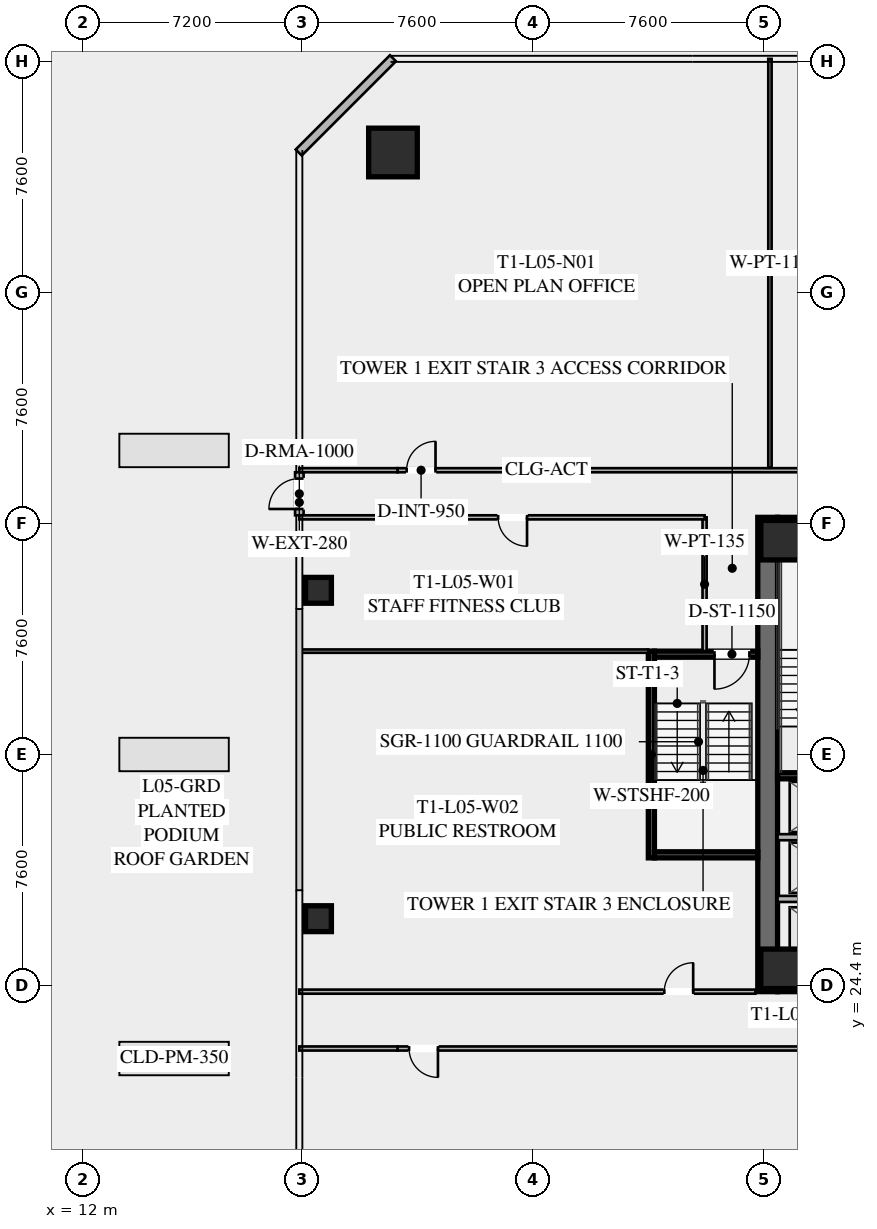
"""IFC4 building model, lengths in metres.
Left out: names, types, materials, properties, quantities, classifications, styles, units other than length and angle.
Written with IfcOpenShell. Run it as: python <this file> out.ifc"""

import sys

from ifc_helpers import new_model, si_unit, direction, frame, frame_2d, origin, origin_2d, place, context, subcontext, project, spatial, rectangle, hollow_rectangle, extrude, element, fill, save


model = new_model("IFC4")
c1 = context("Model", 3, precision=1e-05, world=origin(), true_north=direction((0.0, 1.0)))
c2 = subcontext(c1, "Body", "Model", "MODEL_VIEW")
j1 = project(units=[si_unit("LENGTHUNIT", "METRE"), si_unit("PLANEANGLEUNIT", "RADIAN")], contexts=[c1])
p1 = place(None, origin())
s1 = spatial("IfcSite", under=j1, at=p1, CompositionType="ELEMENT")
p2 = place(p1, origin())
s2 = spatial("IfcBuilding", under=s1, at=p2, CompositionType="ELEMENT")
p3 = place(p2, frame((0.0, 0.0, 24.6)))
s3 = spatial("IfcBuildingStorey", under=s2, at=p3, CompositionType="ELEMENT", Elevation=24.6)
p4 = place(p3, frame((34.525, 24.2, 0.0), z_axis=(0.0, 0.0, 1.0), x_axis=(0.0, 1.0, 0.0)))
e1 = element("IfcWall", 1, at=p4, inside=s3, PredefinedType="SHEAR", context=c2, shape_type="SweptSolid", body=[
    extrude(rectangle(XDim=15.6, YDim=0.65, at=frame_2d((7.8, 0.0))), origin(), (0.0, 0.0, 1.0), 3.55),
])
p5 = place(p3, frame((49.15, 24.525, 0.0), z_axis=(0.0, 0.0, 1.0), x_axis=(-1.0, 0.0, 0.0)))
e2 = element("IfcWall", 2, at=p5, inside=s3, PredefinedType="SHEAR", context=c2, shape_type="SweptSolid", body=[
    extrude(rectangle(XDim=14.3, YDim=0.65, at=frame_2d((7.15, 0.0))), origin(), (0.0, 0.0, 1.0), 3.55),
])
p6 = place(p5, frame((8.85, 0.0, 0.0)))
e3 = element("IfcOpeningElement", 3, at=p6, cuts=e2, PredefinedType="OPENING", context=c2, shape_type="SweptSolid", body=[
    extrude(rectangle(XDim=1.25, YDim=2.25, at=frame_2d((0.625, 1.125))), frame((0.0, 0.335, 0.0), z_axis=(0.0, -1.0, 0.0), x_axis=(1.0, 0.0, 0.0)), (0.0, 0.0, 1.0), 0.67),
])
p7 = place(p5, frame((3.8, 0.0, 0.0)))
e4 = element("IfcOpeningElement", 4, at=p7, cuts=e2, PredefinedType="OPENING", context=c2, shape_type="SweptSolid", body=[
    extrude(rectangle(XDim=1.25, YDim=2.25, at=frame_2d((0.625, 1.125))), frame((0.0, 0.335, 0.0), z_axis=(0.0, -1.0, 0.0), x_axis=(1.0, 0.0, 0.0)), (0.0, 0.0, 1.0), 0.67),
])
p8 = place(p3, frame((34.85, 39.475, 0.0), z_axis=(0.0, 0.0, 1.0), x_axis=(1.0, 0.0, 0.0)))
e5 = element("IfcWall", 5, at=p8, inside=s3, PredefinedType="SHEAR", context=c2, shape_type="SweptSolid", body=[
    extrude(rectangle(XDim=14.3, YDim=0.65, at=frame_2d((7.15, 0.0))), origin(), (0.0, 0.0, 1.0), 3.55),
])
p9 = place(p8, frame((4.2, 0.0, 0.0)))
e6 = element("IfcOpeningElement", 6, at=p9, cuts=e5, PredefinedType="OPENING", context=c2, shape_type="SweptSolid", body=[
    extrude(rectangle(XDim=1.25, YDim=2.25, at=frame_2d((0.625, 1.125))), frame((0.0, 0.335, 0.0), z_axis=(0.0, -1.0, 0.0), x_axis=(1.0, 0.0, 0.0)), (0.0, 0.0, 1.0), 0.67),
])
p10 = place(p8, frame((9.25, 0.0, 0.0)))
e7 = element("IfcOpeningElement", 7, at=p10, cuts=e5, PredefinedType="OPENING", context=c2, shape_type="SweptSolid", body=[
    extrude(rectangle(XDim=1.25, YDim=2.25, at=frame_2d((0.625, 1.125))), frame((0.0, 0.335, 0.0), z_axis=(0.0, -1.0, 0.0), x_axis=(1.0, 0.0, 0.0)), (0.0, 0.0, 1.0), 0.67),
])
for number, where, z_axis, x_axis in (
    (8, (34.95, 24.95, 0.0), (0.0, 0.0, 1.0), (1.0, 0.0, 0.0)),
    (9, (34.95, 39.05, 0.0), (0.0, 0.0, 1.0), (1.0, 0.0, 0.0)),
):
    element("IfcColumn", number, at=place(p3, frame(where, z_axis=z_axis, x_axis=x_axis)), inside=s3, PredefinedType="COLUMN", context=c2, shape_type="SweptSolid", body=[
        extrude(hollow_rectangle(XDim=1.3, YDim=1.3, WallThickness=0.05, at=origin_2d()), origin(), (0.0, 0.0, 1.0), 3.35),
    ])
p11 = place(p3, frame((22.2, 51.8, 0.0), z_axis=(0.0, 0.0, 1.0), x_axis=(1.0, 0.0, 0.0)))
e10 = element("IfcColumn", 10, at=p11, inside=s3, PredefinedType="COLUMN", context=c2, shape_type="SweptSolid", body=[
    extrude(hollow_rectangle(XDim=1.6, YDim=1.6, WallThickness=0.06, at=origin_2d()), origin(), (0.0, 0.0, 1.0), 3.35),
])
for number, where, z_axis, x_axis in (
    (11, (19.75, 37.4, 0.0), (0.0, 0.0, 1.0), (1.0, 0.0, 0.0)),
    (12, (19.75, 26.6, 0.0), (0.0, 0.0, 1.0), (1.0, 0.0, 0.0)),
):
    element("IfcColumn", number, at=place(p3, frame(where, z_axis=z_axis, x_axis=x_axis)), inside=s3, PredefinedType="COLUMN", context=c2, shape_type="SweptSolid", body=[
        extrude(hollow_rectangle(XDim=0.85, YDim=0.85, WallThickness=0.035, at=origin_2d()), origin(), (0.0, 0.0, 1.0), 3.35),
    ])
p12 = place(p3, frame((19.12, 39.867, 0.0), z_axis=(0.0, 0.0, 1.0), x_axis=(0.0, 1.0, 0.0)))
e13 = element("IfcWall", 13, at=p12, inside=s3, PredefinedType="SOLIDWALL", context=c2, shape_type="SweptSolid", body=[
    extrude(rectangle(XDim=1.415, YDim=0.28, at=frame_2d((0.708, 0.0))), origin(), (0.0, 0.0, 1.0), 3.35),
])
p13 = place(p12, frame((0.208, 0.0, 0.0)))
e14 = element("IfcOpeningElement", 14, at=p13, cuts=e13, PredefinedType="OPENING", context=c2, shape_type="SweptSolid", body=[
    extrude(rectangle(XDim=1.0, YDim=2.15, at=frame_2d((0.5, 1.075))), frame((0.0, 0.15, 0.0), z_axis=(0.0, -1.0, 0.0), x_axis=(1.0, 0.0, 0.0)), (0.0, 0.0, 1.0), 0.3),
])
p14 = place(p3, frame((19.1, 51.8, 0.0), z_axis=(0.0, 0.0, 1.0), x_axis=(0.707106781187, 0.707106781187, 0.0)))
e15 = element("IfcWall", 15, at=p14, inside=s3, PredefinedType="SOLIDWALL", context=c2, shape_type="SweptSolid", body=[
    extrude(rectangle(XDim=4.384, YDim=0.28, at=frame_2d((2.192, 0.0))), origin(), (0.0, 0.0, 1.0), 3.35),
])
for number, where, z_axis, x_axis in (
    (16, (34.85, 31.3, 0.0), (0.0, 0.0, 1.0), (1.0, 0.0, 0.0)),
    (17, (34.85, 38.7, 0.0), (0.0, 0.0, 1.0), (1.0, 0.0, 0.0)),
):
    element("IfcWall", number, at=place(p3, frame(where, z_axis=z_axis, x_axis=x_axis)), inside=s3, PredefinedType="SHEAR", context=c2, shape_type="SweptSolid", body=[
        extrude(rectangle(XDim=3.45, YDim=0.2, at=frame_2d((1.725, 0.0))), origin(), (0.0, 0.0, 1.0), 3.35),
    ])
for number, where, z_axis, x_axis in (
    (18, (34.85, 27.25, 0.0), (0.0, 0.0, 1.0), (1.0, 0.0, 0.0)),
    (19, (34.85, 29.28, 0.0), (0.0, 0.0, 1.0), (1.0, 0.0, 0.0)),
):
    element("IfcWall", number, at=place(p3, frame(where, z_axis=z_axis, x_axis=x_axis)), inside=s3, PredefinedType="SOLIDWALL", context=c2, shape_type="SweptSolid", body=[
        extrude(rectangle(XDim=3.1, YDim=0.2, at=frame_2d((1.55, 0.0))), origin(), (0.0, 0.0, 1.0), 3.35),
    ])
p15 = place(p3, frame((30.7, 28.6, 0.0), z_axis=(0.0, 0.0, 1.0), x_axis=(0.0, 1.0, 0.0)))
e20 = element("IfcWall", 20, at=p15, inside=s3, PredefinedType="SHEAR", context=c2, shape_type="SweptSolid", body=[
    extrude(rectangle(XDim=6.8, YDim=0.2, at=frame_2d((3.4, 0.0))), origin(), (0.0, 0.0, 1.0), 3.35),
])
p16 = place(p3, frame((34.2, 35.3, 0.0), z_axis=(0.0, 0.0, 1.0), x_axis=(-1.0, 0.0, 0.0)))
e21 = element("IfcWall", 21, at=p16, inside=s3, PredefinedType="SHEAR", context=c2, shape_type="SweptSolid", body=[
    extrude(rectangle(XDim=3.4, YDim=0.2, at=frame_2d((1.7, 0.0))), origin(), (0.0, 0.0, 1.0), 3.35),
])
p17 = place(p16, frame((0.275, 0.0, 0.0)))
e22 = element("IfcOpeningElement", 22, at=p17, cuts=e21, PredefinedType="OPENING", context=c2, shape_type="SweptSolid", body=[
    extrude(rectangle(XDim=1.15, YDim=2.2, at=frame_2d((0.575, 1.1))), frame((0.0, 0.11, 0.0), z_axis=(0.0, -1.0, 0.0), x_axis=(1.0, 0.0, 0.0)), (0.0, 0.0, 1.0), 0.22),
])
p18 = place(p3, frame((30.8, 28.7, 0.0), z_axis=(0.0, 0.0, 1.0), x_axis=(1.0, 0.0, 0.0)))
e23 = element("IfcWall", 23, at=p18, inside=s3, PredefinedType="SHEAR", context=c2, shape_type="SweptSolid", body=[
    extrude(rectangle(XDim=3.4, YDim=0.2, at=frame_2d((1.7, 0.0))), origin(), (0.0, 0.0, 1.0), 3.35),
])
p19 = place(p3, frame((32.45, 35.4, 0.0), z_axis=(0.0, 0.0, 1.0), x_axis=(0.0, 1.0, 0.0)))
e24 = element("IfcWall", 24, at=p19, inside=s3, PredefinedType="PARTITIONING", context=c2, shape_type="SweptSolid", body=[
    extrude(rectangle(XDim=4.4, YDim=0.135, at=frame_2d((2.2, 0.0))), origin(), (0.0, 0.0, 1.0), 2.703),
])
p20 = place(p3, frame((22.35, 41.35, 0.0), z_axis=(0.0, 0.0, 1.0), x_axis=(1.0, 0.0, 0.0)))
e25 = element("IfcWall", 25, at=p20, inside=s3, PredefinedType="PARTITIONING", context=c2, shape_type="SweptSolid", body=[
    extrude(rectangle(XDim=29.0, YDim=0.135, at=frame_2d((14.5, 0.0))), origin(), (0.0, 0.0, 1.0), 2.703),
])
p21 = place(p20, frame((0.3, 0.0, 0.0)))
e26 = element("IfcOpeningElement", 26, at=p21, cuts=e25, PredefinedType="OPENING", context=c2, shape_type="SweptSolid", body=[
    extrude(rectangle(XDim=0.95, YDim=2.05, at=frame_2d((0.475, 1.025))), frame((0.0, 0.077, 0.0), z_axis=(0.0, -1.0, 0.0), x_axis=(1.0, 0.0, 0.0)), (0.0, 0.0, 1.0), 0.155),
])
p22 = place(p20, frame((19.299, 0.0, 0.0)))
e27 = element("IfcOpeningElement", 27, at=p22, cuts=e25, PredefinedType="OPENING", context=c2, shape_type="SweptSolid", body=[
    extrude(rectangle(XDim=0.95, YDim=2.05, at=frame_2d((0.475, 1.025))), frame((0.0, 0.077, 0.0), z_axis=(0.0, -1.0, 0.0), x_axis=(1.0, 0.0, 0.0)), (0.0, 0.0, 1.0), 0.155),
])
p23 = place(p20, frame((27.75, 0.0, 0.0)))
e28 = element("IfcOpeningElement", 28, at=p23, cuts=e25, PredefinedType="OPENING", context=c2, shape_type="SweptSolid", body=[
    extrude(rectangle(XDim=0.95, YDim=2.05, at=frame_2d((0.475, 1.025))), frame((0.0, 0.077, 0.0), z_axis=(0.0, -1.0, 0.0), x_axis=(1.0, 0.0, 0.0)), (0.0, 0.0, 1.0), 0.155),
])
p24 = place(p3, frame((19.12, 41.35, 0.0), z_axis=(0.0, 0.0, 1.0), x_axis=(1.0, 0.0, 0.0)))
e29 = element("IfcWall", 29, at=p24, inside=s3, PredefinedType="PARTITIONING", context=c2, shape_type="SweptSolid", body=[
    extrude(rectangle(XDim=3.23, YDim=0.135, at=frame_2d((1.615, 0.0))), origin(), (0.0, 0.0, 1.0), 2.703),
])
p25 = place(p3, frame((34.6, 41.43, 0.0), z_axis=(0.0, 0.0, 1.0), x_axis=(0.0, 1.0, 0.0)))
e30 = element("IfcWall", 30, at=p25, inside=s3, PredefinedType="PARTITIONING", context=c2, shape_type="SweptSolid", body=[
    extrude(rectangle(XDim=13.45, YDim=0.11, at=frame_2d((6.725, 0.0))), origin(), (0.0, 0.0, 1.0), 2.703),
])
p26 = place(p3, frame((51.35, 22.33, 0.0), z_axis=(0.0, 0.0, 1.0), x_axis=(-1.0, 0.0, 0.0)))
e31 = element("IfcWall", 31, at=p26, inside=s3, PredefinedType="PARTITIONING", context=c2, shape_type="SweptSolid", body=[
    extrude(rectangle(XDim=29.0, YDim=0.135, at=frame_2d((14.5, 0.0))), origin(), (0.0, 0.0, 1.0), 2.703),
])
p27 = place(p26, frame((27.67, 0.0, 0.0)))
e32 = element("IfcOpeningElement", 32, at=p27, cuts=e31, PredefinedType="OPENING", context=c2, shape_type="SweptSolid", body=[
    extrude(rectangle(XDim=0.95, YDim=2.05, at=frame_2d((0.475, 1.025))), frame((0.0, 0.077, 0.0), z_axis=(0.0, -1.0, 0.0), x_axis=(1.0, 0.0, 0.0)), (0.0, 0.0, 1.0), 0.155),
])
p28 = place(p26, frame((8.775, 0.0, 0.0)))
e33 = element("IfcOpeningElement", 33, at=p28, cuts=e31, PredefinedType="OPENING", context=c2, shape_type="SweptSolid", body=[
    extrude(rectangle(XDim=0.95, YDim=2.05, at=frame_2d((0.475, 1.025))), frame((0.0, 0.077, 0.0), z_axis=(0.0, -1.0, 0.0), x_axis=(1.0, 0.0, 0.0)), (0.0, 0.0, 1.0), 0.155),
])
p29 = place(p26, frame((0.38, 0.0, 0.0)))
e34 = element("IfcOpeningElement", 34, at=p29, cuts=e31, PredefinedType="OPENING", context=c2, shape_type="SweptSolid", body=[
    extrude(rectangle(XDim=0.95, YDim=2.05, at=frame_2d((0.475, 1.025))), frame((0.0, 0.077, 0.0), z_axis=(0.0, -1.0, 0.0), x_axis=(1.0, 0.0, 0.0)), (0.0, 0.0, 1.0), 0.155),
])
p30 = place(p3, frame((19.12, 22.33, 0.0), z_axis=(0.0, 0.0, 1.0), x_axis=(1.0, 0.0, 0.0)))
e35 = element("IfcWall", 35, at=p30, inside=s3, PredefinedType="PARTITIONING", context=c2, shape_type="SweptSolid", body=[
    extrude(rectangle(XDim=3.23, YDim=0.135, at=frame_2d((1.615, 0.0))), origin(), (0.0, 0.0, 1.0), 2.703),
])
p31 = place(p3, frame((32.45, 39.8, 0.0), z_axis=(0.0, 0.0, 1.0), x_axis=(-1.0, 0.0, 0.0)))
e36 = element("IfcWall", 36, at=p31, inside=s3, PredefinedType="PARTITIONING", context=c2, shape_type="SweptSolid", body=[
    extrude(rectangle(XDim=13.33, YDim=0.135, at=frame_2d((6.665, 0.0))), origin(), (0.0, 0.0, 1.0), 2.703),
])
p32 = place(p31, frame((5.84, 0.0, 0.0)))
e37 = element("IfcOpeningElement", 37, at=p32, cuts=e36, PredefinedType="OPENING", context=c2, shape_type="SweptSolid", body=[
    extrude(rectangle(XDim=0.95, YDim=2.05, at=frame_2d((0.475, 1.025))), frame((0.0, 0.077, 0.0), z_axis=(0.0, -1.0, 0.0), x_axis=(1.0, 0.0, 0.0)), (0.0, 0.0, 1.0), 0.155),
])
p33 = place(p3, frame((19.12, 24.2, 0.0), z_axis=(0.0, 0.0, 1.0), x_axis=(1.0, 0.0, 0.0)))
e38 = element("IfcWall", 38, at=p33, inside=s3, PredefinedType="PARTITIONING", context=c2, shape_type="SweptSolid", body=[
    extrude(rectangle(XDim=15.0, YDim=0.135, at=frame_2d((7.5, 0.0))), origin(), (0.0, 0.0, 1.0), 2.703),
])
p34 = place(p33, frame((12.005, 0.0, 0.0)))
e39 = element("IfcOpeningElement", 39, at=p34, cuts=e38, PredefinedType="OPENING", context=c2, shape_type="SweptSolid", body=[
    extrude(rectangle(XDim=0.95, YDim=2.05, at=frame_2d((0.475, 1.025))), frame((0.0, 0.077, 0.0), z_axis=(0.0, -1.0, 0.0), x_axis=(1.0, 0.0, 0.0)), (0.0, 0.0, 1.0), 0.155),
])
p35 = place(p3, frame((30.6, 35.4, 0.0), z_axis=(0.0, 0.0, 1.0), x_axis=(-1.0, 0.0, 0.0)))
e40 = element("IfcWall", 40, at=p35, inside=s3, PredefinedType="PARTITIONING", context=c2, shape_type="SweptSolid", body=[
    extrude(rectangle(XDim=11.48, YDim=0.11, at=frame_2d((5.74, 0.0))), origin(), (0.0, 0.0, 1.0), 2.703),
])
p36 = place(p13, origin())
e41 = element("IfcDoor", 41, at=p36, inside=s3, OperationType="SINGLE_SWING_LEFT", PredefinedType="DOOR", context=c2, shape_type="SweptSolid", body=[
    extrude(rectangle(XDim=1.0, YDim=2.15, at=frame_2d((0.5, 1.075))), frame((0.0, 0.025, 0.0), z_axis=(0.0, -1.0, 0.0), x_axis=(1.0, 0.0, 0.0)), (0.0, 0.0, 1.0), 0.05),
])
fill(e14, e41)
p37 = place(p17, origin())
e42 = element("IfcDoor", 42, at=p37, inside=s3, OperationType="SINGLE_SWING_RIGHT", PredefinedType="DOOR", context=c2, shape_type="SweptSolid", body=[
    extrude(rectangle(XDim=1.15, YDim=2.2, at=frame_2d((0.575, 1.1))), frame((0.0, 0.025, 0.0), z_axis=(0.0, -1.0, 0.0), x_axis=(1.0, 0.0, 0.0)), (0.0, 0.0, 1.0), 0.05),
])
fill(e22, e42)
p38 = place(p21, origin())
e43 = element("IfcDoor", 43, at=p38, inside=s3, OperationType="SINGLE_SWING_RIGHT", PredefinedType="DOOR", context=c2, shape_type="SweptSolid", body=[
    extrude(rectangle(XDim=0.95, YDim=2.05, at=frame_2d((0.475, 1.025))), frame((0.0, 0.025, 0.0), z_axis=(0.0, -1.0, 0.0), x_axis=(1.0, 0.0, 0.0)), (0.0, 0.0, 1.0), 0.05),
])
fill(e26, e43)
p39 = place(p27, origin())
e44 = element("IfcDoor", 44, at=p39, inside=s3, OperationType="SINGLE_SWING_LEFT", PredefinedType="DOOR", context=c2, shape_type="SweptSolid", body=[
    extrude(rectangle(XDim=0.95, YDim=2.05, at=frame_2d((0.475, 1.025))), frame((0.0, 0.025, 0.0), z_axis=(0.0, -1.0, 0.0), x_axis=(1.0, 0.0, 0.0)), (0.0, 0.0, 1.0), 0.05),
])
fill(e32, e44)
p40 = place(p32, origin())
e45 = element("IfcDoor", 45, at=p40, inside=s3, OperationType="SINGLE_SWING_LEFT", PredefinedType="DOOR", context=c2, shape_type="SweptSolid", body=[
    extrude(rectangle(XDim=0.95, YDim=2.05, at=frame_2d((0.475, 1.025))), frame((0.0, 0.025, 0.0), z_axis=(0.0, -1.0, 0.0), x_axis=(1.0, 0.0, 0.0)), (0.0, 0.0, 1.0), 0.05),
])
fill(e37, e45)
p41 = place(p34, origin())
e46 = element("IfcDoor", 46, at=p41, inside=s3, OperationType="SINGLE_SWING_RIGHT", PredefinedType="DOOR", context=c2, shape_type="SweptSolid", body=[
    extrude(rectangle(XDim=0.95, YDim=2.05, at=frame_2d((0.475, 1.025))), frame((0.0, 0.025, 0.0), z_axis=(0.0, -1.0, 0.0), x_axis=(1.0, 0.0, 0.0)), (0.0, 0.0, 1.0), 0.05),
])
fill(e39, e46)
save(model, sys.argv[1])
